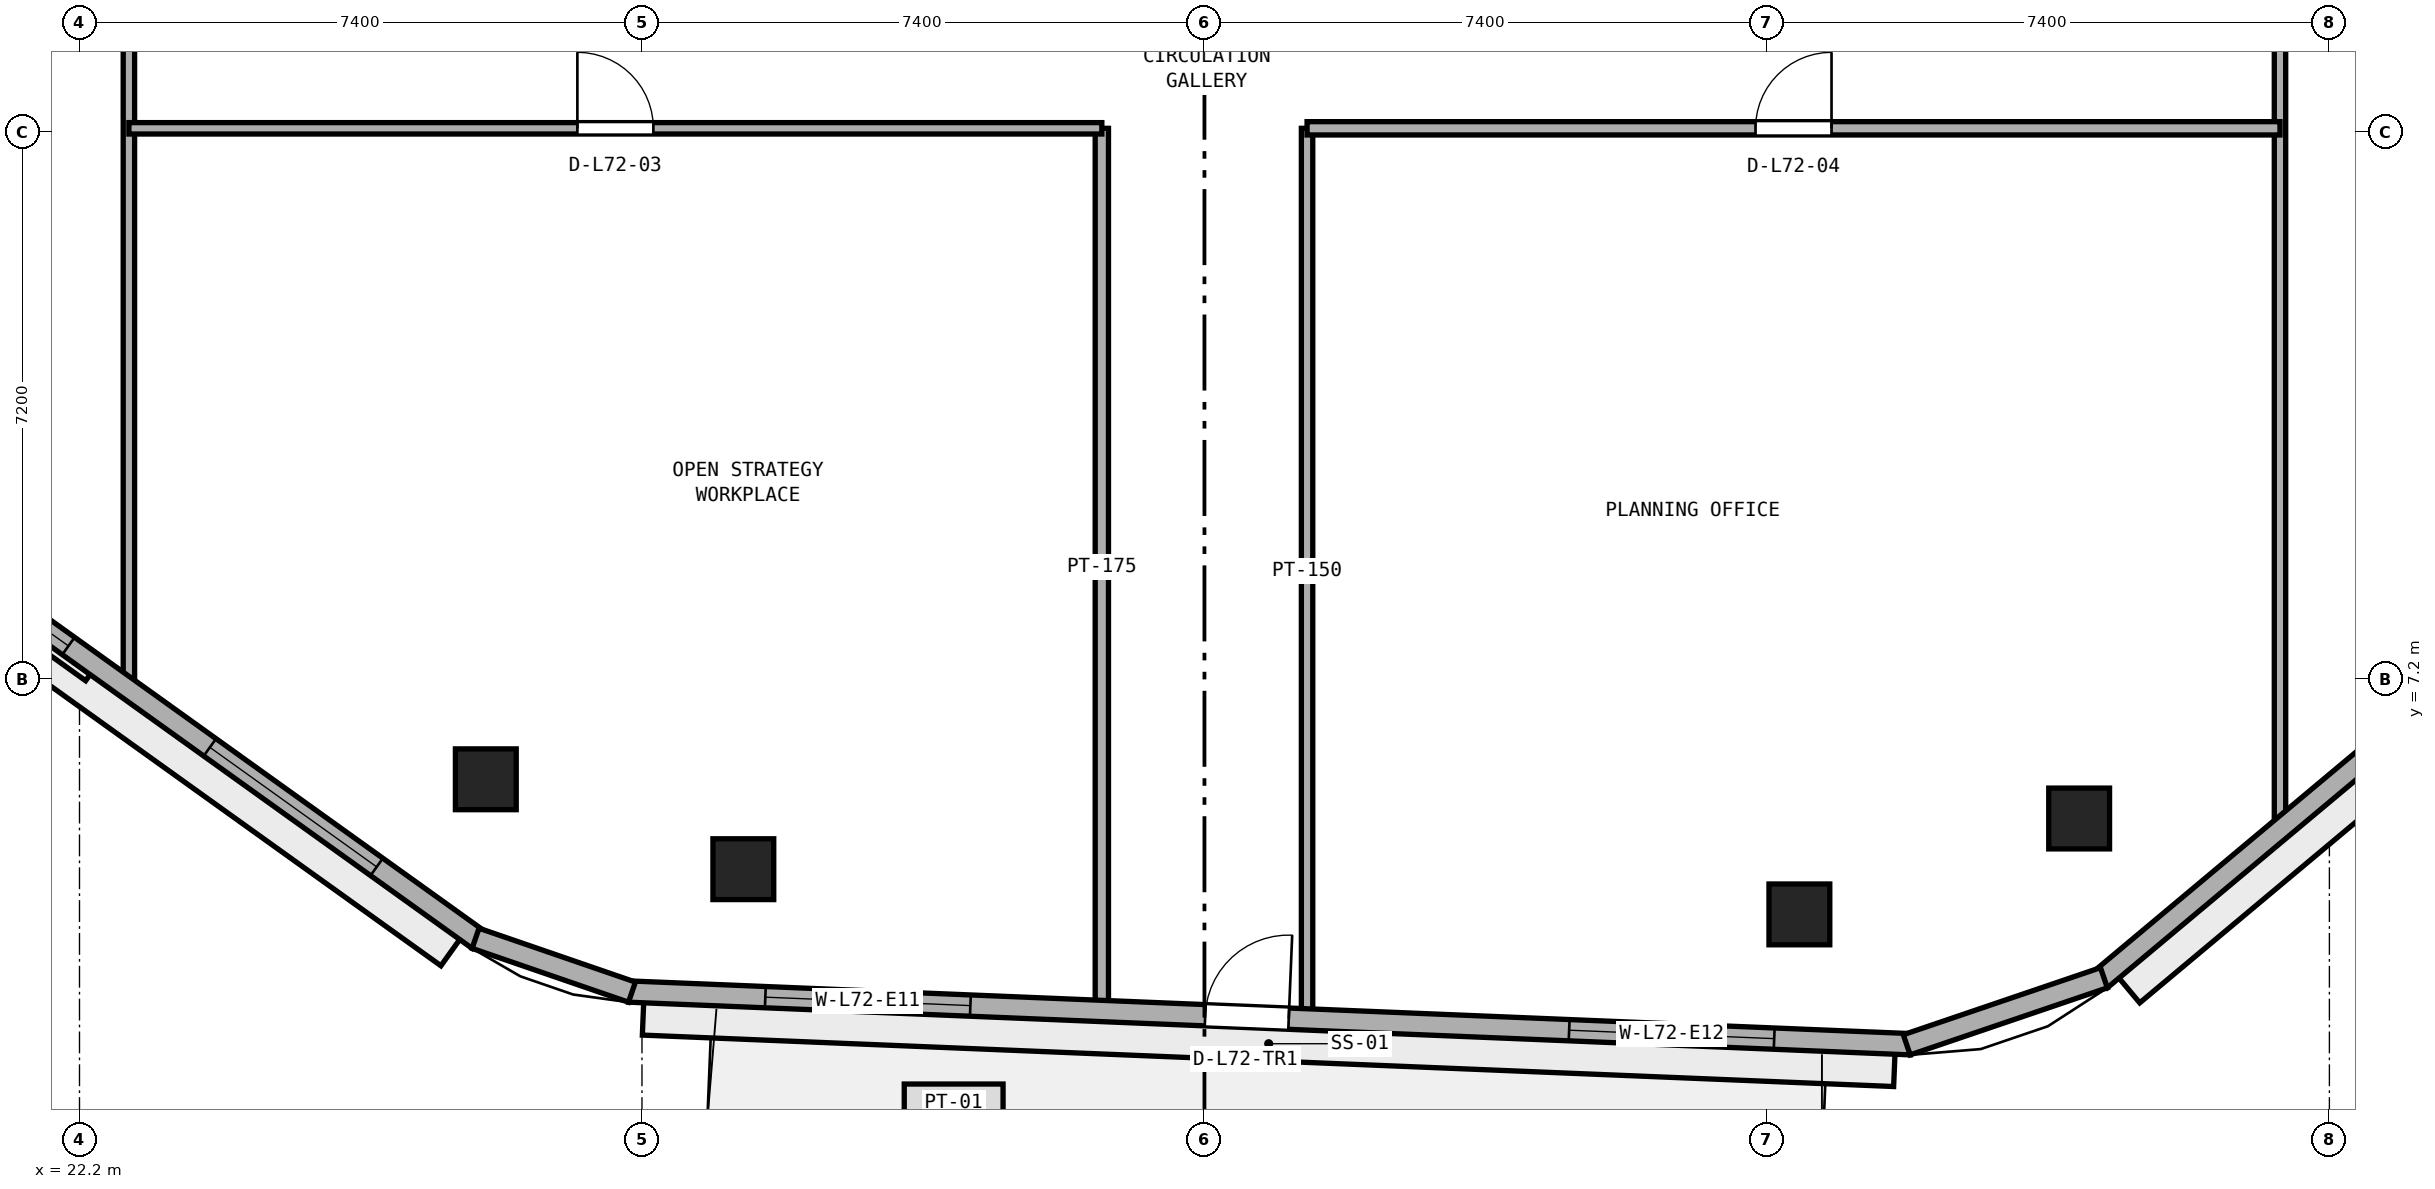
"""IFC4 building model, lengths in metres.
Left out: names, types, materials, properties, quantities, classifications, styles, units other than length and angle.
Written with IfcOpenShell. Run it as: python <this file> out.ifc"""

import sys

from ifc_helpers import new_model, si_unit, direction, frame, frame_2d, origin, origin_2d, place, context, subcontext, project, spatial, rectangle, extrude, element, fill, save


model = new_model("IFC4")
c1 = context("Model", 3, precision=1e-05, world=origin(), true_north=direction((0.0, 1.0)))
c2 = subcontext(c1, "Body", "Model", "MODEL_VIEW")
j1 = project(units=[si_unit("LENGTHUNIT", "METRE"), si_unit("PLANEANGLEUNIT", "RADIAN")], contexts=[c1])
p1 = place(None, origin())
s1 = spatial("IfcSite", under=j1, at=p1, CompositionType="ELEMENT")
p2 = place(p1, origin())
s2 = spatial("IfcBuilding", under=s1, at=p2, CompositionType="ELEMENT")
p3 = place(p2, frame((0.0, 0.0, 282.0)))
s3 = spatial("IfcBuildingStorey", under=s2, at=p3, CompositionType="ELEMENT", Elevation=282.0)
for number, where, z_axis, x_axis in (
    (1, (30.934, 4.703, 0.0), (0.0, 0.0, 1.0), (1.0, 0.0, 0.0)),
    (2, (44.827, 4.108, 0.0), (0.0, 0.0, 1.0), (1.0, 0.0, 0.0)),
    (3, (48.508, 5.37, 0.0), (0.0, 0.0, 1.0), (1.0, 0.0, 0.0)),
    (4, (27.545, 5.886, 0.0), (0.0, 0.0, 1.0), (1.0, 0.0, 0.0)),
):
    element("IfcColumn", number, at=place(p3, frame(where, z_axis=z_axis, x_axis=x_axis)), inside=s3, PredefinedType="COLUMN", context=c2, shape_type="SweptSolid", body=[
        extrude(rectangle(XDim=0.8, YDim=0.8, at=origin_2d()), origin(), (0.0, 0.0, 1.0), 3.8),
    ])
p4 = place(p3, frame((51.15, 5.182, 0.0), z_axis=(0.0, 0.0, 1.0), x_axis=(0.0, 1.0, 0.0)))
e5 = element("IfcWall", 5, at=p4, inside=s3, PredefinedType="PARTITIONING", context=c2, shape_type="SweptSolid", body=[
    extrude(rectangle(XDim=22.618, YDim=0.15, at=frame_2d((11.309, 0.0))), origin(), (0.0, 0.0, 1.0), 3.54),
])
p5 = place(p4, frame((15.323, 0.0, 0.0)))
e6 = element("IfcOpeningElement", 6, at=p5, cuts=e5, PredefinedType="OPENING", context=c2, shape_type="SweptSolid", body=[
    extrude(rectangle(XDim=1.0, YDim=2.12, at=frame_2d((0.5, 1.06))), frame((0.0, 0.085, 0.0), z_axis=(0.0, -1.0, 0.0), x_axis=(1.0, 0.0, 0.0)), (0.0, 0.0, 1.0), 0.17),
])
p6 = place(p3, frame((38.35, 2.792, 0.0), z_axis=(0.0, 0.0, 1.0), x_axis=(0.0, 1.0, 0.0)))
e7 = element("IfcWall", 7, at=p6, inside=s3, PredefinedType="PARTITIONING", context=c2, shape_type="SweptSolid", body=[
    extrude(rectangle(XDim=11.658, YDim=0.15, at=frame_2d((5.829, 0.0))), origin(), (0.0, 0.0, 1.0), 3.54),
])
p7 = place(p3, frame((35.65, 2.902, 0.0), z_axis=(0.0, 0.0, 1.0), x_axis=(0.0, 1.0, 0.0)))
e8 = element("IfcWall", 8, at=p7, inside=s3, PredefinedType="PARTITIONING", context=c2, shape_type="SweptSolid", body=[
    extrude(rectangle(XDim=11.548, YDim=0.175, at=frame_2d((5.774, 0.0))), origin(), (0.0, 0.0, 1.0), 3.54),
])
p8 = place(p3, frame((22.85, 7.037, 0.0), z_axis=(0.0, 0.0, 1.0), x_axis=(0.0, 1.0, 0.0)))
e9 = element("IfcWall", 9, at=p8, inside=s3, PredefinedType="PARTITIONING", context=c2, shape_type="SweptSolid", body=[
    extrude(rectangle(XDim=36.013, YDim=0.15, at=frame_2d((18.007, 0.0))), origin(), (0.0, 0.0, 1.0), 3.54),
])
p9 = place(p8, frame((10.088, 0.0, 0.0)))
e10 = element("IfcOpeningElement", 10, at=p9, cuts=e9, PredefinedType="OPENING", context=c2, shape_type="SweptSolid", body=[
    extrude(rectangle(XDim=0.9, YDim=2.1, at=frame_2d((0.45, 1.05))), frame((0.0, 0.085, 0.0), z_axis=(0.0, -1.0, 0.0), x_axis=(1.0, 0.0, 0.0)), (0.0, 0.0, 1.0), 0.17),
])
p10 = place(p8, frame((16.963, 0.0, 0.0)))
e11 = element("IfcOpeningElement", 11, at=p10, cuts=e9, PredefinedType="OPENING", context=c2, shape_type="SweptSolid", body=[
    extrude(rectangle(XDim=0.9, YDim=2.1, at=frame_2d((0.45, 1.05))), frame((0.0, 0.085, 0.0), z_axis=(0.0, -1.0, 0.0), x_axis=(1.0, 0.0, 0.0)), (0.0, 0.0, 1.0), 0.17),
])
p11 = place(p8, frame((24.588, 0.0, 0.0)))
e12 = element("IfcOpeningElement", 12, at=p11, cuts=e9, PredefinedType="OPENING", context=c2, shape_type="SweptSolid", body=[
    extrude(rectangle(XDim=0.9, YDim=2.1, at=frame_2d((0.45, 1.05))), frame((0.0, 0.085, 0.0), z_axis=(0.0, -1.0, 0.0), x_axis=(1.0, 0.0, 0.0)), (0.0, 0.0, 1.0), 0.17),
])
p12 = place(p3, frame((22.85, 14.45, 0.0), z_axis=(0.0, 0.0, 1.0), x_axis=(1.0, 0.0, 0.0)))
e13 = element("IfcWall", 13, at=p12, inside=s3, PredefinedType="PARTITIONING", context=c2, shape_type="SweptSolid", body=[
    extrude(rectangle(XDim=12.8, YDim=0.15, at=frame_2d((6.4, 0.0))), origin(), (0.0, 0.0, 1.0), 3.54),
])
p13 = place(p12, frame((5.9, 0.0, 0.0)))
e14 = element("IfcOpeningElement", 14, at=p13, cuts=e13, PredefinedType="OPENING", context=c2, shape_type="SweptSolid", body=[
    extrude(rectangle(XDim=1.0, YDim=2.12, at=frame_2d((0.5, 1.06))), frame((0.0, 0.085, 0.0), z_axis=(0.0, -1.0, 0.0), x_axis=(1.0, 0.0, 0.0)), (0.0, 0.0, 1.0), 0.17),
])
p14 = place(p3, frame((38.35, 14.45, 0.0), z_axis=(0.0, 0.0, 1.0), x_axis=(1.0, 0.0, 0.0)))
e15 = element("IfcWall", 15, at=p14, inside=s3, PredefinedType="PARTITIONING", context=c2, shape_type="SweptSolid", body=[
    extrude(rectangle(XDim=12.8, YDim=0.175, at=frame_2d((6.4, 0.0))), origin(), (0.0, 0.0, 1.0), 3.54),
])
p15 = place(p14, frame((5.9, 0.0, 0.0)))
e16 = element("IfcOpeningElement", 16, at=p15, cuts=e15, PredefinedType="OPENING", context=c2, shape_type="SweptSolid", body=[
    extrude(rectangle(XDim=1.0, YDim=2.12, at=frame_2d((0.5, 1.06))), frame((0.0, 0.097, 0.0), z_axis=(0.0, -1.0, 0.0), x_axis=(1.0, 0.0, 0.0)), (0.0, 0.0, 1.0), 0.195),
])
p16 = place(p3, frame((29.428, 3.093, 0.0), z_axis=(0.0, 0.0, 1.0), x_axis=(0.999156257967, -0.041070331944, 0.0)))
e17 = element("IfcWall", 17, at=p16, inside=s3, PredefinedType="STANDARD", context=c2, shape_type="SweptSolid", body=[
    extrude(rectangle(XDim=16.876, YDim=0.28, at=frame_2d((8.438, 0.0))), origin(), (0.0, 0.0, 1.0), 3.54),
])
p17 = place(p16, frame((7.588, 0.0, 0.0)))
e18 = element("IfcOpeningElement", 18, at=p17, cuts=e17, PredefinedType="OPENING", context=c2, shape_type="SweptSolid", body=[
    extrude(rectangle(XDim=1.1, YDim=2.2, at=frame_2d((0.55, 1.1))), frame((0.0, 0.15, 0.0), z_axis=(0.0, -1.0, 0.0), x_axis=(1.0, 0.0, 0.0)), (0.0, 0.0, 1.0), 0.3),
])
p18 = place(p16, frame((1.796, 0.0, 0.9)))
e19 = element("IfcOpeningElement", 19, at=p18, cuts=e17, PredefinedType="OPENING", context=c2, shape_type="SweptSolid", body=[
    extrude(rectangle(XDim=2.7, YDim=1.75, at=frame_2d((1.35, 0.875))), frame((0.0, 0.15, 0.0), z_axis=(0.0, -1.0, 0.0), x_axis=(1.0, 0.0, 0.0)), (0.0, 0.0, 1.0), 0.3),
])
p19 = place(p16, frame((12.38, 0.0, 0.9)))
e20 = element("IfcOpeningElement", 20, at=p19, cuts=e17, PredefinedType="OPENING", context=c2, shape_type="SweptSolid", body=[
    extrude(rectangle(XDim=2.7, YDim=1.75, at=frame_2d((1.35, 0.875))), frame((0.0, 0.15, 0.0), z_axis=(0.0, -1.0, 0.0), x_axis=(1.0, 0.0, 0.0)), (0.0, 0.0, 1.0), 0.3),
])
p20 = place(p3, frame((48.789, 3.25, 0.0), z_axis=(0.0, 0.0, 1.0), x_axis=(0.767032672101, 0.641608042288, 0.0)))
e21 = element("IfcWall", 21, at=p20, inside=s3, PredefinedType="STANDARD", context=c2, shape_type="SweptSolid", body=[
    extrude(rectangle(XDim=16.113, YDim=0.28, at=frame_2d((8.057, 0.0))), origin(), (0.0, 0.0, 1.0), 3.54),
])
p21 = place(p20, frame((6.707, 0.0, 0.9)))
e22 = element("IfcOpeningElement", 22, at=p21, cuts=e21, PredefinedType="OPENING", context=c2, shape_type="SweptSolid", body=[
    extrude(rectangle(XDim=2.7, YDim=1.75, at=frame_2d((1.35, 0.875))), frame((0.0, 0.15, 0.0), z_axis=(0.0, -1.0, 0.0), x_axis=(1.0, 0.0, 0.0)), (0.0, 0.0, 1.0), 0.3),
])
p22 = place(p20, frame((11.744, 0.0, 0.9)))
e23 = element("IfcOpeningElement", 23, at=p22, cuts=e21, PredefinedType="OPENING", context=c2, shape_type="SweptSolid", body=[
    extrude(rectangle(XDim=2.7, YDim=1.75, at=frame_2d((1.35, 0.875))), frame((0.0, 0.15, 0.0), z_axis=(0.0, -1.0, 0.0), x_axis=(1.0, 0.0, 0.0)), (0.0, 0.0, 1.0), 0.3),
])
p23 = place(p3, frame((14.468, 13.077, 0.0), z_axis=(0.0, 0.0, 1.0), x_axis=(0.812809888039, -0.582529042972, 0.0)))
e24 = element("IfcWall", 24, at=p23, inside=s3, PredefinedType="STANDARD", context=c2, shape_type="SweptSolid", body=[
    extrude(rectangle(XDim=15.968, YDim=0.28, at=frame_2d((7.984, 0.0))), origin(), (0.0, 0.0, 1.0), 3.54),
])
p24 = place(p23, frame((1.645, 0.0, 0.9)))
e25 = element("IfcOpeningElement", 25, at=p24, cuts=e24, PredefinedType="OPENING", context=c2, shape_type="SweptSolid", body=[
    extrude(rectangle(XDim=2.7, YDim=1.75, at=frame_2d((1.35, 0.875))), frame((0.0, 0.15, 0.0), z_axis=(0.0, -1.0, 0.0), x_axis=(1.0, 0.0, 0.0)), (0.0, 0.0, 1.0), 0.3),
])
p25 = place(p23, frame((6.634, 0.0, 0.9)))
e26 = element("IfcOpeningElement", 26, at=p25, cuts=e24, PredefinedType="OPENING", context=c2, shape_type="SweptSolid", body=[
    extrude(rectangle(XDim=2.7, YDim=1.75, at=frame_2d((1.35, 0.875))), frame((0.0, 0.15, 0.0), z_axis=(0.0, -1.0, 0.0), x_axis=(1.0, 0.0, 0.0)), (0.0, 0.0, 1.0), 0.3),
])
p26 = place(p23, frame((11.623, 0.0, 0.9)))
e27 = element("IfcOpeningElement", 27, at=p26, cuts=e24, PredefinedType="OPENING", context=c2, shape_type="SweptSolid", body=[
    extrude(rectangle(XDim=2.7, YDim=1.75, at=frame_2d((1.35, 0.875))), frame((0.0, 0.15, 0.0), z_axis=(0.0, -1.0, 0.0), x_axis=(1.0, 0.0, 0.0)), (0.0, 0.0, 1.0), 0.3),
])
p27 = place(p3, frame((46.24, 2.393, 0.0), z_axis=(0.0, 0.0, 1.0), x_axis=(0.946759165502, 0.321942669643, 0.0)))
e28 = element("IfcWall", 28, at=p27, inside=s3, PredefinedType="STANDARD", context=c2, shape_type="SweptSolid", body=[
    extrude(rectangle(XDim=2.74, YDim=0.28, at=frame_2d((1.37, 0.0))), origin(), (0.0, 0.0, 1.0), 3.54),
])
p28 = place(p3, frame((27.411, 3.794, 0.0), z_axis=(0.0, 0.0, 1.0), x_axis=(0.945552869008, -0.325468542121, 0.0)))
e29 = element("IfcWall", 29, at=p28, inside=s3, PredefinedType="STANDARD", context=c2, shape_type="SweptSolid", body=[
    extrude(rectangle(XDim=2.176, YDim=0.28, at=frame_2d((1.088, 0.0))), origin(), (0.0, 0.0, 1.0), 3.54),
])
p29 = place(p13, origin())
e30 = element("IfcDoor", 30, at=p29, inside=s3, OperationType="SINGLE_SWING_LEFT", PredefinedType="DOOR", context=c2, shape_type="SweptSolid", body=[
    extrude(rectangle(XDim=1.0, YDim=2.12, at=frame_2d((0.5, 1.06))), frame((0.0, 0.025, 0.0), z_axis=(0.0, -1.0, 0.0), x_axis=(1.0, 0.0, 0.0)), (0.0, 0.0, 1.0), 0.05),
])
fill(e14, e30)
p30 = place(p15, origin())
e31 = element("IfcDoor", 31, at=p30, inside=s3, OperationType="SINGLE_SWING_RIGHT", PredefinedType="DOOR", context=c2, shape_type="SweptSolid", body=[
    extrude(rectangle(XDim=1.0, YDim=2.12, at=frame_2d((0.5, 1.06))), frame((0.0, 0.025, 0.0), z_axis=(0.0, -1.0, 0.0), x_axis=(1.0, 0.0, 0.0)), (0.0, 0.0, 1.0), 0.05),
])
fill(e16, e31)
p31 = place(p17, origin())
e32 = element("IfcDoor", 32, at=p31, inside=s3, OperationType="SINGLE_SWING_RIGHT", PredefinedType="DOOR", context=c2, shape_type="SweptSolid", body=[
    extrude(rectangle(XDim=1.1, YDim=2.2, at=frame_2d((0.55, 1.1))), frame((0.0, 0.025, 0.0), z_axis=(0.0, -1.0, 0.0), x_axis=(1.0, 0.0, 0.0)), (0.0, 0.0, 1.0), 0.05),
])
fill(e18, e32)
p32 = place(p18, origin())
e33 = element("IfcWindow", 33, at=p32, inside=s3, PartitioningType="SINGLE_PANEL", PredefinedType="WINDOW", context=c2, shape_type="SweptSolid", body=[
    extrude(rectangle(XDim=2.7, YDim=1.75, at=frame_2d((1.35, 0.875))), frame((0.0, 0.03, 0.0), z_axis=(0.0, -1.0, 0.0), x_axis=(1.0, 0.0, 0.0)), (0.0, 0.0, 1.0), 0.06),
])
fill(e19, e33)
p33 = place(p19, origin())
e34 = element("IfcWindow", 34, at=p33, inside=s3, PartitioningType="SINGLE_PANEL", PredefinedType="WINDOW", context=c2, shape_type="SweptSolid", body=[
    extrude(rectangle(XDim=2.7, YDim=1.75, at=frame_2d((1.35, 0.875))), frame((0.0, 0.03, 0.0), z_axis=(0.0, -1.0, 0.0), x_axis=(1.0, 0.0, 0.0)), (0.0, 0.0, 1.0), 0.06),
])
fill(e20, e34)
p34 = place(p25, origin())
e35 = element("IfcWindow", 35, at=p34, inside=s3, PartitioningType="SINGLE_PANEL", PredefinedType="WINDOW", context=c2, shape_type="SweptSolid", body=[
    extrude(rectangle(XDim=2.7, YDim=1.75, at=frame_2d((1.35, 0.875))), frame((0.0, 0.03, 0.0), z_axis=(0.0, -1.0, 0.0), x_axis=(1.0, 0.0, 0.0)), (0.0, 0.0, 1.0), 0.06),
])
fill(e26, e35)
p35 = place(p26, origin())
e36 = element("IfcWindow", 36, at=p35, inside=s3, PartitioningType="SINGLE_PANEL", PredefinedType="WINDOW", context=c2, shape_type="SweptSolid", body=[
    extrude(rectangle(XDim=2.7, YDim=1.75, at=frame_2d((1.35, 0.875))), frame((0.0, 0.03, 0.0), z_axis=(0.0, -1.0, 0.0), x_axis=(1.0, 0.0, 0.0)), (0.0, 0.0, 1.0), 0.06),
])
fill(e27, e36)
save(model, sys.argv[1])
